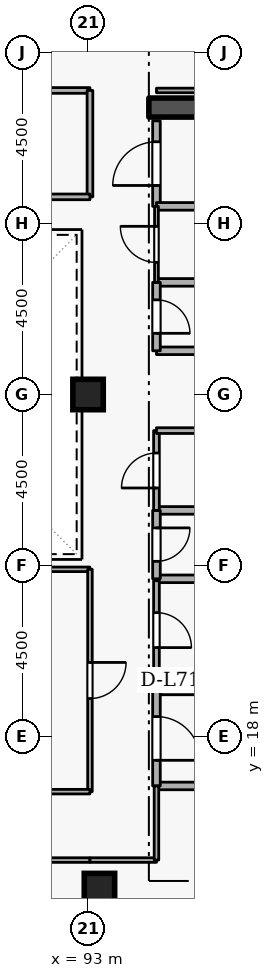
"""IFC4 building model, lengths in metres.
Left out: names, types, materials, properties, quantities, classifications, styles, units other than length and angle.
Written with IfcOpenShell. Run it as: python <this file> out.ifc"""

import sys

from ifc_helpers import new_model, si_unit, direction, frame, frame_2d, origin, origin_2d, place, context, subcontext, project, spatial, rectangle, extrude, element, fill, save


model = new_model("IFC4")
c1 = context("Model", 3, precision=1e-05, world=origin(), true_north=direction((0.0, 1.0)))
c2 = subcontext(c1, "Body", "Model", "MODEL_VIEW")
j1 = project(units=[si_unit("LENGTHUNIT", "METRE"), si_unit("PLANEANGLEUNIT", "RADIAN")], contexts=[c1])
p1 = place(None, origin())
s1 = spatial("IfcSite", under=j1, at=p1, CompositionType="ELEMENT")
p2 = place(p1, origin())
s2 = spatial("IfcBuilding", under=s1, at=p2, CompositionType="ELEMENT")
p3 = place(p2, frame((0.0, 0.0, 265.5)))
s3 = spatial("IfcBuildingStorey", under=s2, at=p3, CompositionType="ELEMENT", Elevation=265.5)
p4 = place(p3, frame((94.6, 34.55, 0.0), z_axis=(0.0, 0.0, 1.0), x_axis=(1.0, 0.0, 0.0)))
e1 = element("IfcWall", 1, at=p4, inside=s3, PredefinedType="SHEAR", context=c2, shape_type="SweptSolid", body=[
    extrude(rectangle(XDim=5.8, YDim=0.5, at=frame_2d((2.9, 0.0))), origin(), (0.0, 0.0, 1.0), 3.6),
])
for number, where, z_axis, x_axis in (
    (2, (93.3, 14.0, 0.0), (0.0, 0.0, 1.0), (1.0, 0.0, 0.0)),
    (3, (93.0, 27.0, 0.0), (0.0, 0.0, 1.0), (1.0, 0.0, 0.0)),
):
    element("IfcColumn", number, at=place(p3, frame(where, z_axis=z_axis, x_axis=x_axis)), inside=s3, PredefinedType="COLUMN", context=c2, shape_type="SweptSolid", body=[
        extrude(rectangle(XDim=0.8, YDim=0.8, at=origin_2d()), origin(), (0.0, 0.0, 1.0), 3.6),
    ])
p5 = place(p3, frame((94.8, 16.7, 0.0), z_axis=(0.0, 0.0, 1.0), x_axis=(1.0, 0.0, 0.0)))
e4 = element("IfcWall", 4, at=p5, inside=s3, PredefinedType="STANDARD", context=c2, shape_type="SweptSolid", body=[
    extrude(rectangle(XDim=5.7, YDim=0.2, at=frame_2d((2.85, 0.0))), origin(), (0.0, 0.0, 1.0), 3.34),
])
p6 = place(p3, frame((97.1, 19.2, 0.0), z_axis=(0.0, 0.0, 1.0), x_axis=(-1.0, 0.0, 0.0)))
e5 = element("IfcWall", 5, at=p6, inside=s3, PredefinedType="STANDARD", context=c2, shape_type="SweptSolid", body=[
    extrude(rectangle(XDim=2.3, YDim=0.2, at=frame_2d((1.15, 0.0))), origin(), (0.0, 0.0, 1.0), 2.545),
])
p7 = place(p3, frame((94.8, 19.2, 0.0), z_axis=(0.0, 0.0, 1.0), x_axis=(0.0, -1.0, 0.0)))
e6 = element("IfcWall", 6, at=p7, inside=s3, PredefinedType="STANDARD", context=c2, shape_type="SweptSolid", body=[
    extrude(rectangle(XDim=2.5, YDim=0.2, at=frame_2d((1.25, 0.0))), origin(), (0.0, 0.0, 1.0), 3.34),
])
p8 = place(p7, frame((0.675, 0.0, 0.0)))
e7 = element("IfcOpeningElement", 7, at=p8, cuts=e6, PredefinedType="OPENING", context=c2, shape_type="SweptSolid", body=[
    extrude(rectangle(XDim=1.15, YDim=2.1, at=frame_2d((0.575, 1.05))), frame((0.0, 0.11, 0.0), z_axis=(0.0, -1.0, 0.0), x_axis=(1.0, 0.0, 0.0)), (0.0, 0.0, 1.0), 0.22),
])
for number, where, z_axis, x_axis in (
    (8, (94.8, 28.15, 0.0), (0.0, 0.0, 1.0), (1.0, 0.0, 0.0)),
    (9, (96.85, 29.95, 0.0), (0.0, 0.0, 1.0), (-1.0, 0.0, 0.0)),
):
    element("IfcWall", number, at=place(p3, frame(where, z_axis=z_axis, x_axis=x_axis)), inside=s3, PredefinedType="STANDARD", context=c2, shape_type="SweptSolid", body=[
        extrude(rectangle(XDim=2.05, YDim=0.2, at=frame_2d((1.025, 0.0))), origin(), (0.0, 0.0, 1.0), 3.34),
    ])
p9 = place(p3, frame((94.8, 29.95, 0.0), z_axis=(0.0, 0.0, 1.0), x_axis=(0.0, -1.0, 0.0)))
e10 = element("IfcWall", 10, at=p9, inside=s3, PredefinedType="STANDARD", context=c2, shape_type="SweptSolid", body=[
    extrude(rectangle(XDim=1.8, YDim=0.2, at=frame_2d((0.9, 0.0))), origin(), (0.0, 0.0, 1.0), 3.34),
])
p10 = place(p9, frame((0.46, 0.0, 0.0)))
e11 = element("IfcOpeningElement", 11, at=p10, cuts=e10, PredefinedType="OPENING", context=c2, shape_type="SweptSolid", body=[
    extrude(rectangle(XDim=0.88, YDim=2.04, at=frame_2d((0.44, 1.02))), frame((0.0, 0.11, 0.0), z_axis=(0.0, -1.0, 0.0), x_axis=(1.0, 0.0, 0.0)), (0.0, 0.0, 1.0), 0.22),
])
for number, where, z_axis, x_axis in (
    (12, (94.8, 22.15, 0.0), (0.0, 0.0, 1.0), (1.0, 0.0, 0.0)),
    (13, (96.85, 23.95, 0.0), (0.0, 0.0, 1.0), (-1.0, 0.0, 0.0)),
):
    element("IfcWall", number, at=place(p3, frame(where, z_axis=z_axis, x_axis=x_axis)), inside=s3, PredefinedType="STANDARD", context=c2, shape_type="SweptSolid", body=[
        extrude(rectangle(XDim=2.05, YDim=0.2, at=frame_2d((1.025, 0.0))), origin(), (0.0, 0.0, 1.0), 3.34),
    ])
p11 = place(p3, frame((94.8, 23.95, 0.0), z_axis=(0.0, 0.0, 1.0), x_axis=(0.0, -1.0, 0.0)))
e14 = element("IfcWall", 14, at=p11, inside=s3, PredefinedType="STANDARD", context=c2, shape_type="SweptSolid", body=[
    extrude(rectangle(XDim=1.8, YDim=0.2, at=frame_2d((0.9, 0.0))), origin(), (0.0, 0.0, 1.0), 3.34),
])
p12 = place(p11, frame((0.46, 0.0, 0.0)))
e15 = element("IfcOpeningElement", 15, at=p12, cuts=e14, PredefinedType="OPENING", context=c2, shape_type="SweptSolid", body=[
    extrude(rectangle(XDim=0.88, YDim=2.04, at=frame_2d((0.44, 1.02))), frame((0.0, 0.11, 0.0), z_axis=(0.0, -1.0, 0.0), x_axis=(1.0, 0.0, 0.0)), (0.0, 0.0, 1.0), 0.22),
])
p13 = place(p3, frame((94.8, 31.95, 0.0), z_axis=(0.0, 0.0, 1.0), x_axis=(0.0, 1.0, 0.0)))
e16 = element("IfcWall", 16, at=p13, inside=s3, PredefinedType="STANDARD", context=c2, shape_type="SweptSolid", body=[
    extrude(rectangle(XDim=2.25, YDim=0.2, at=frame_2d((1.125, 0.0))), origin(), (0.0, 0.0, 1.0), 3.34),
])
p14 = place(p13, frame((0.55, 0.0, 0.0)))
e17 = element("IfcOpeningElement", 17, at=p14, cuts=e16, PredefinedType="OPENING", context=c2, shape_type="SweptSolid", body=[
    extrude(rectangle(XDim=1.15, YDim=2.1, at=frame_2d((0.575, 1.05))), frame((0.0, 0.11, 0.0), z_axis=(0.0, -1.0, 0.0), x_axis=(1.0, 0.0, 0.0)), (0.0, 0.0, 1.0), 0.22),
])
p15 = place(p3, frame((96.85, 31.95, 0.0), z_axis=(0.0, 0.0, 1.0), x_axis=(-1.0, 0.0, 0.0)))
e18 = element("IfcWall", 18, at=p15, inside=s3, PredefinedType="STANDARD", context=c2, shape_type="SweptSolid", body=[
    extrude(rectangle(XDim=2.05, YDim=0.2, at=frame_2d((1.025, 0.0))), origin(), (0.0, 0.0, 1.0), 3.34),
])
p16 = place(p3, frame((94.8, 19.5, 0.0), z_axis=(0.0, 0.0, 1.0), x_axis=(1.0, 0.0, 0.0)))
e19 = element("IfcWall", 19, at=p16, inside=s3, PredefinedType="PARTITIONING", context=c2, shape_type="SweptSolid", body=[
    extrude(rectangle(XDim=2.05, YDim=0.15, at=frame_2d((1.025, 0.0))), origin(), (0.0, 0.0, 1.0), 2.545),
])
p17 = place(p3, frame((94.8, 22.1, 0.0), z_axis=(0.0, 0.0, 1.0), x_axis=(0.0, -1.0, 0.0)))
e20 = element("IfcWall", 20, at=p17, inside=s3, PredefinedType="PARTITIONING", context=c2, shape_type="SweptSolid", body=[
    extrude(rectangle(XDim=2.6, YDim=0.15, at=frame_2d((1.3, 0.0))), origin(), (0.0, 0.0, 1.0), 3.34),
])
p18 = place(p17, frame((0.84, 0.0, 0.0)))
e21 = element("IfcOpeningElement", 21, at=p18, cuts=e20, PredefinedType="OPENING", context=c2, shape_type="SweptSolid", body=[
    extrude(rectangle(XDim=0.92, YDim=2.08, at=frame_2d((0.46, 1.04))), frame((0.0, 0.085, 0.0), z_axis=(0.0, -1.0, 0.0), x_axis=(1.0, 0.0, 0.0)), (0.0, 0.0, 1.0), 0.17),
])
p19 = place(p3, frame((94.8, 23.95, 0.0), z_axis=(0.0, 0.0, 1.0), x_axis=(0.0, 1.0, 0.0)))
e22 = element("IfcWall", 22, at=p19, inside=s3, PredefinedType="PARTITIONING", context=c2, shape_type="SweptSolid", body=[
    extrude(rectangle(XDim=2.1, YDim=0.15, at=frame_2d((1.05, 0.0))), origin(), (0.0, 0.0, 1.0), 3.34),
])
p20 = place(p19, frame((0.59, 0.0, 0.0)))
e23 = element("IfcOpeningElement", 23, at=p20, cuts=e22, PredefinedType="OPENING", context=c2, shape_type="SweptSolid", body=[
    extrude(rectangle(XDim=0.92, YDim=2.08, at=frame_2d((0.46, 1.04))), frame((0.0, 0.085, 0.0), z_axis=(0.0, -1.0, 0.0), x_axis=(1.0, 0.0, 0.0)), (0.0, 0.0, 1.0), 0.17),
])
p21 = place(p3, frame((94.8, 26.05, 0.0), z_axis=(0.0, 0.0, 1.0), x_axis=(1.0, 0.0, 0.0)))
e24 = element("IfcWall", 24, at=p21, inside=s3, PredefinedType="PARTITIONING", context=c2, shape_type="SweptSolid", body=[
    extrude(rectangle(XDim=2.05, YDim=0.15, at=frame_2d((1.025, 0.0))), origin(), (0.0, 0.0, 1.0), 3.34),
])
p22 = place(p3, frame((94.8, 29.95, 0.0), z_axis=(0.0, 0.0, 1.0), x_axis=(0.0, 1.0, 0.0)))
e25 = element("IfcWall", 25, at=p22, inside=s3, PredefinedType="PARTITIONING", context=c2, shape_type="SweptSolid", body=[
    extrude(rectangle(XDim=2.0, YDim=0.1, at=frame_2d((1.0, 0.0))), origin(), (0.0, 0.0, 1.0), 3.34),
])
p23 = place(p22, frame((0.525, 0.0, 0.0)))
e26 = element("IfcOpeningElement", 26, at=p23, cuts=e25, PredefinedType="OPENING", context=c2, shape_type="SweptSolid", body=[
    extrude(rectangle(XDim=0.95, YDim=2.1, at=frame_2d((0.475, 1.05))), frame((0.0, 0.06, 0.0), z_axis=(0.0, -1.0, 0.0), x_axis=(1.0, 0.0, 0.0)), (0.0, 0.0, 1.0), 0.12),
])
p24 = place(p3, frame((94.8, 35.0, 0.0), z_axis=(0.0, 0.0, 1.0), x_axis=(1.0, 0.0, 0.0)))
e27 = element("IfcWall", 27, at=p24, inside=s3, PredefinedType="PARTITIONING", context=c2, shape_type="SweptSolid", body=[
    extrude(rectangle(XDim=5.9, YDim=0.12, at=frame_2d((2.95, 0.0))), origin(), (0.0, 0.0, 1.0), 3.34),
])
p25 = place(p3, frame((87.3, 14.75, 0.0), z_axis=(0.0, 0.0, 1.0), x_axis=(1.0, 0.0, 0.0)))
e28 = element("IfcWall", 28, at=p25, inside=s3, PredefinedType="PARTITIONING", context=c2, shape_type="SweptSolid", body=[
    extrude(rectangle(XDim=5.75, YDim=0.12, at=frame_2d((2.875, 0.0))), origin(), (0.0, 0.0, 1.0), 3.34),
])
p26 = place(p25, frame((2.35, 0.0, 0.0)))
e29 = element("IfcOpeningElement", 29, at=p26, cuts=e28, PredefinedType="OPENING", context=c2, shape_type="SweptSolid", body=[
    extrude(rectangle(XDim=1.05, YDim=2.1, at=frame_2d((0.525, 1.05))), frame((0.0, 0.07, 0.0), z_axis=(0.0, -1.0, 0.0), x_axis=(1.0, 0.0, 0.0)), (0.0, 0.0, 1.0), 0.14),
])
p27 = place(p3, frame((93.05, 14.75, 0.0), z_axis=(0.0, 0.0, 1.0), x_axis=(1.0, 0.0, 0.0)))
e30 = element("IfcWall", 30, at=p27, inside=s3, PredefinedType="PARTITIONING", context=c2, shape_type="SweptSolid", body=[
    extrude(rectangle(XDim=1.75, YDim=0.12, at=frame_2d((0.875, 0.0))), origin(), (0.0, 0.0, 1.0), 3.34),
])
p28 = place(p3, frame((94.8, 14.75, 0.0), z_axis=(0.0, 0.0, 1.0), x_axis=(0.0, 1.0, 0.0)))
e31 = element("IfcWall", 31, at=p28, inside=s3, PredefinedType="PARTITIONING", context=c2, shape_type="SweptSolid", body=[
    extrude(rectangle(XDim=1.95, YDim=0.12, at=frame_2d((0.975, 0.0))), origin(), (0.0, 0.0, 1.0), 3.34),
])
p29 = place(p3, frame((87.3, 22.4, 0.0), z_axis=(0.0, 0.0, 1.0), x_axis=(1.0, 0.0, 0.0)))
e32 = element("IfcWall", 32, at=p29, inside=s3, PredefinedType="PARTITIONING", context=c2, shape_type="SweptSolid", body=[
    extrude(rectangle(XDim=5.75, YDim=0.12, at=frame_2d((2.875, 0.0))), origin(), (0.0, 0.0, 1.0), 3.34),
])
p30 = place(p3, frame((93.05, 22.4, 0.0), z_axis=(0.0, 0.0, 1.0), x_axis=(0.0, -1.0, 0.0)))
e33 = element("IfcWall", 33, at=p30, inside=s3, PredefinedType="PARTITIONING", context=c2, shape_type="SweptSolid", body=[
    extrude(rectangle(XDim=5.85, YDim=0.12, at=frame_2d((2.925, 0.0))), origin(), (0.0, 0.0, 1.0), 3.34),
])
p31 = place(p30, frame((2.45, 0.0, 0.0)))
e34 = element("IfcOpeningElement", 34, at=p31, cuts=e33, PredefinedType="OPENING", context=c2, shape_type="SweptSolid", body=[
    extrude(rectangle(XDim=0.95, YDim=2.1, at=frame_2d((0.475, 1.05))), frame((0.0, 0.07, 0.0), z_axis=(0.0, -1.0, 0.0), x_axis=(1.0, 0.0, 0.0)), (0.0, 0.0, 1.0), 0.14),
])
p32 = place(p3, frame((93.05, 16.55, 0.0), z_axis=(0.0, 0.0, 1.0), x_axis=(-1.0, 0.0, 0.0)))
e35 = element("IfcWall", 35, at=p32, inside=s3, PredefinedType="PARTITIONING", context=c2, shape_type="SweptSolid", body=[
    extrude(rectangle(XDim=5.75, YDim=0.12, at=frame_2d((2.875, 0.0))), origin(), (0.0, 0.0, 1.0), 3.34),
])
p33 = place(p3, frame((88.5, 35.0, 0.0), z_axis=(0.0, 0.0, 1.0), x_axis=(1.0, 0.0, 0.0)))
e36 = element("IfcWall", 36, at=p33, inside=s3, PredefinedType="PARTITIONING", context=c2, shape_type="SweptSolid", body=[
    extrude(rectangle(XDim=4.55, YDim=0.15, at=frame_2d((2.275, 0.0))), origin(), (0.0, 0.0, 1.0), 3.34),
])
p34 = place(p33, frame((1.625, 0.0, 0.0)))
e37 = element("IfcOpeningElement", 37, at=p34, cuts=e36, PredefinedType="OPENING", context=c2, shape_type="SweptSolid", body=[
    extrude(rectangle(XDim=1.3, YDim=2.12, at=frame_2d((0.65, 1.06))), frame((0.0, 0.085, 0.0), z_axis=(0.0, -1.0, 0.0), x_axis=(1.0, 0.0, 0.0)), (0.0, 0.0, 1.0), 0.17),
])
p35 = place(p3, frame((93.05, 35.0, 0.0), z_axis=(0.0, 0.0, 1.0), x_axis=(0.0, -1.0, 0.0)))
e38 = element("IfcWall", 38, at=p35, inside=s3, PredefinedType="PARTITIONING", context=c2, shape_type="SweptSolid", body=[
    extrude(rectangle(XDim=2.8, YDim=0.15, at=frame_2d((1.4, 0.0))), origin(), (0.0, 0.0, 1.0), 3.34),
])
p36 = place(p3, frame((93.05, 32.2, 0.0), z_axis=(0.0, 0.0, 1.0), x_axis=(-1.0, 0.0, 0.0)))
e39 = element("IfcWall", 39, at=p36, inside=s3, PredefinedType="PARTITIONING", context=c2, shape_type="SweptSolid", body=[
    extrude(rectangle(XDim=4.55, YDim=0.15, at=frame_2d((2.275, 0.0))), origin(), (0.0, 0.0, 1.0), 3.34),
])
p37 = place(p8, origin())
e40 = element("IfcDoor", 40, at=p37, inside=s3, OperationType="SINGLE_SWING_RIGHT", PredefinedType="DOOR", context=c2, shape_type="SweptSolid", body=[
    extrude(rectangle(XDim=1.15, YDim=2.1, at=frame_2d((0.575, 1.05))), frame((0.0, 0.025, 0.0), z_axis=(0.0, -1.0, 0.0), x_axis=(1.0, 0.0, 0.0)), (0.0, 0.0, 1.0), 0.05),
])
fill(e7, e40)
p38 = place(p10, origin())
e41 = element("IfcDoor", 41, at=p38, inside=s3, OperationType="SINGLE_SWING_RIGHT", PredefinedType="DOOR", context=c2, shape_type="SweptSolid", body=[
    extrude(rectangle(XDim=0.88, YDim=2.04, at=frame_2d((0.44, 1.02))), frame((0.0, 0.025, 0.0), z_axis=(0.0, -1.0, 0.0), x_axis=(1.0, 0.0, 0.0)), (0.0, 0.0, 1.0), 0.05),
])
fill(e11, e41)
p39 = place(p12, origin())
e42 = element("IfcDoor", 42, at=p39, inside=s3, OperationType="SINGLE_SWING_LEFT", PredefinedType="DOOR", context=c2, shape_type="SweptSolid", body=[
    extrude(rectangle(XDim=0.88, YDim=2.04, at=frame_2d((0.44, 1.02))), frame((0.0, 0.025, 0.0), z_axis=(0.0, -1.0, 0.0), x_axis=(1.0, 0.0, 0.0)), (0.0, 0.0, 1.0), 0.05),
])
fill(e15, e42)
p40 = place(p18, origin())
e43 = element("IfcDoor", 43, at=p40, inside=s3, OperationType="SINGLE_SWING_RIGHT", PredefinedType="DOOR", context=c2, shape_type="SweptSolid", body=[
    extrude(rectangle(XDim=0.92, YDim=2.08, at=frame_2d((0.46, 1.04))), frame((0.0, 0.025, 0.0), z_axis=(0.0, -1.0, 0.0), x_axis=(1.0, 0.0, 0.0)), (0.0, 0.0, 1.0), 0.05),
])
fill(e21, e43)
p41 = place(p20, origin())
e44 = element("IfcDoor", 44, at=p41, inside=s3, OperationType="SINGLE_SWING_LEFT", PredefinedType="DOOR", context=c2, shape_type="SweptSolid", body=[
    extrude(rectangle(XDim=0.92, YDim=2.08, at=frame_2d((0.46, 1.04))), frame((0.0, 0.025, 0.0), z_axis=(0.0, -1.0, 0.0), x_axis=(1.0, 0.0, 0.0)), (0.0, 0.0, 1.0), 0.05),
])
fill(e23, e44)
p42 = place(p23, origin())
e45 = element("IfcDoor", 45, at=p42, inside=s3, OperationType="SINGLE_SWING_RIGHT", PredefinedType="DOOR", context=c2, shape_type="SweptSolid", body=[
    extrude(rectangle(XDim=0.95, YDim=2.1, at=frame_2d((0.475, 1.05))), frame((0.0, 0.025, 0.0), z_axis=(0.0, -1.0, 0.0), x_axis=(1.0, 0.0, 0.0)), (0.0, 0.0, 1.0), 0.05),
])
fill(e26, e45)
p43 = place(p14, origin())
e46 = element("IfcDoor", 46, at=p43, inside=s3, OperationType="SINGLE_SWING_LEFT", PredefinedType="DOOR", context=c2, shape_type="SweptSolid", body=[
    extrude(rectangle(XDim=1.15, YDim=2.1, at=frame_2d((0.575, 1.05))), frame((0.0, 0.025, 0.0), z_axis=(0.0, -1.0, 0.0), x_axis=(1.0, 0.0, 0.0)), (0.0, 0.0, 1.0), 0.05),
])
fill(e17, e46)
p44 = place(p31, origin())
e47 = element("IfcDoor", 47, at=p44, inside=s3, OperationType="SINGLE_SWING_LEFT", PredefinedType="DOOR", context=c2, shape_type="SweptSolid", body=[
    extrude(rectangle(XDim=0.95, YDim=2.1, at=frame_2d((0.475, 1.05))), frame((0.0, 0.025, 0.0), z_axis=(0.0, -1.0, 0.0), x_axis=(1.0, 0.0, 0.0)), (0.0, 0.0, 1.0), 0.05),
])
fill(e34, e47)
save(model, sys.argv[1])
